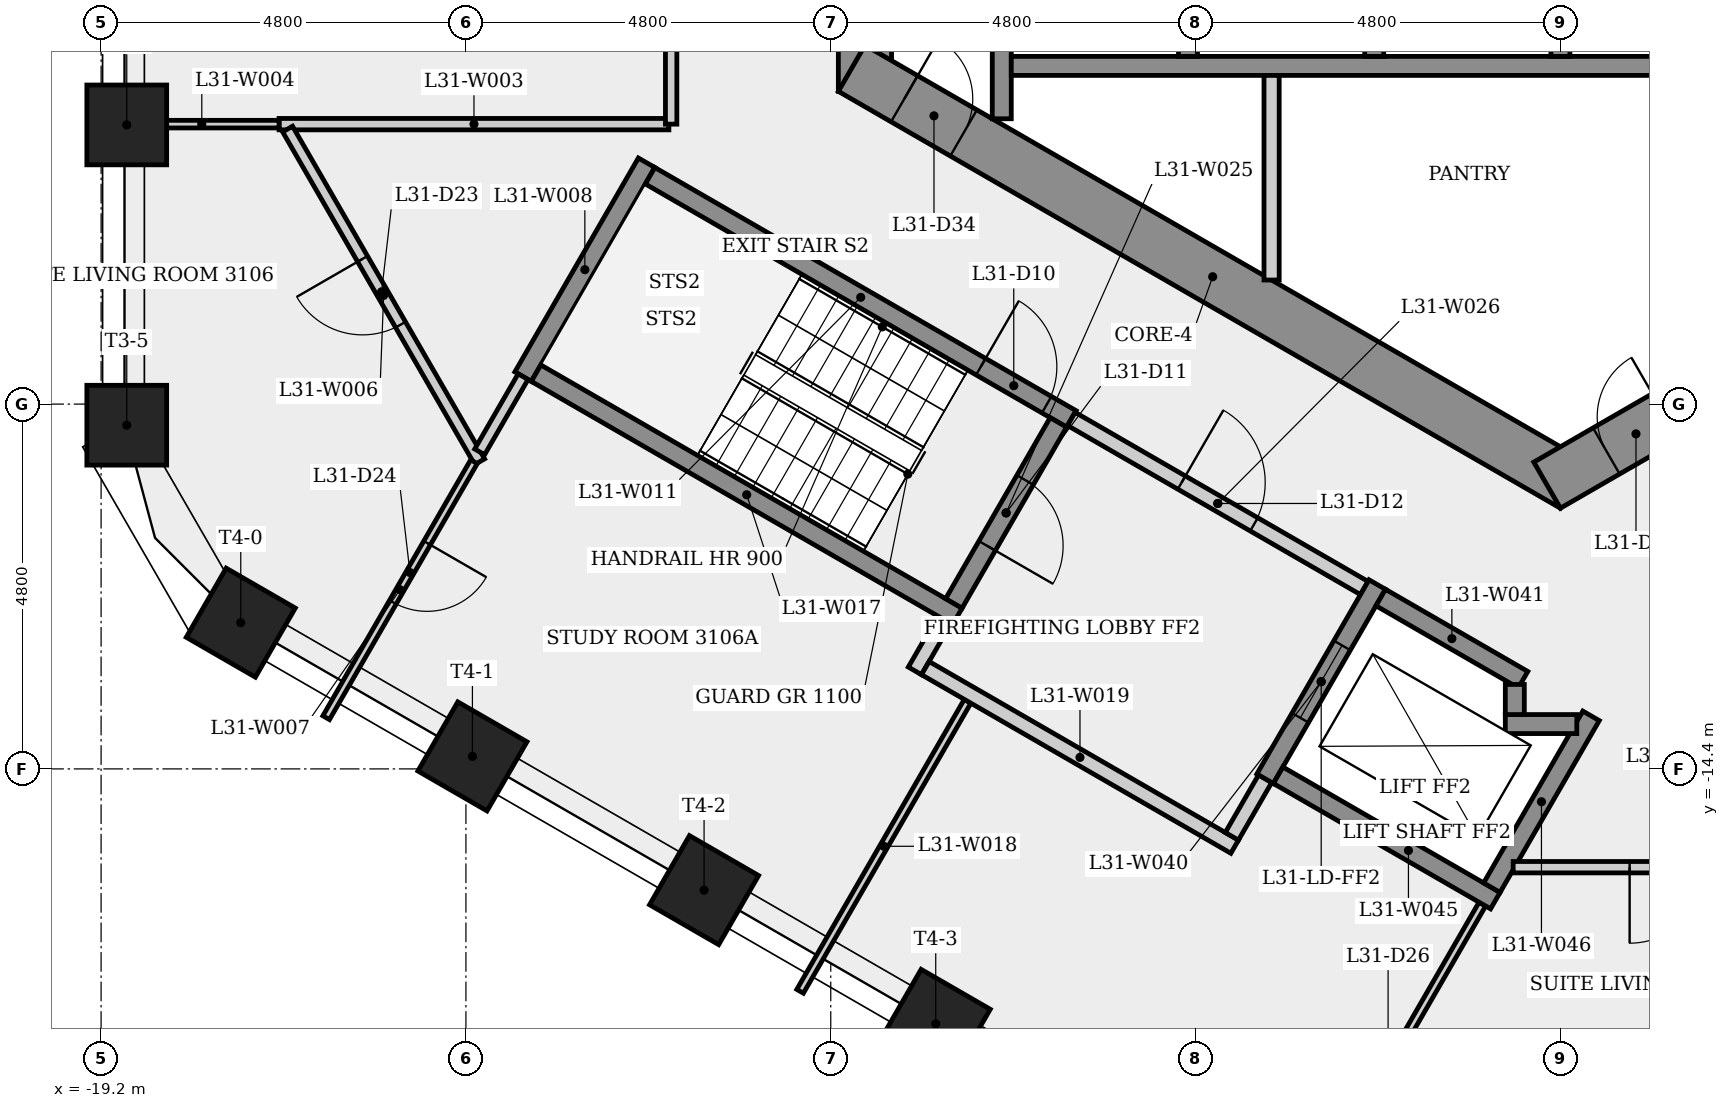
"""IFC4 building model, lengths in metres.
Left out: names, types, materials, properties, quantities, classifications, styles, units other than length and angle.
Written with IfcOpenShell. Run it as: python <this file> out.ifc"""

import sys

from ifc_helpers import new_model, si_unit, direction, frame, frame_2d, origin, origin_2d, place, context, subcontext, project, spatial, rectangle, extrude, element, fill, save


model = new_model("IFC4")
c1 = context("Model", 3, precision=1e-05, world=origin(), true_north=direction((0.0, 1.0)))
c2 = subcontext(c1, "Body", "Model", "MODEL_VIEW")
j1 = project(units=[si_unit("LENGTHUNIT", "METRE"), si_unit("PLANEANGLEUNIT", "RADIAN")], contexts=[c1])
p1 = place(None, origin())
s1 = spatial("IfcSite", under=j1, at=p1, CompositionType="ELEMENT")
p2 = place(p1, origin())
s2 = spatial("IfcBuilding", under=s1, at=p2, CompositionType="ELEMENT")
p3 = place(p2, frame((0.0, 0.0, 117.1)))
s3 = spatial("IfcBuildingStorey", under=s2, at=p3, CompositionType="ELEMENT", Elevation=117.1)
p4 = place(p3, frame((-9.15, 5.485, 0.0), z_axis=(0.0, 0.0, 1.0), x_axis=(0.0, -1.0, 0.0)))
e1 = element("IfcWall", 1, at=p4, inside=s3, PredefinedType="SHEAR", context=c2, shape_type="SweptSolid", body=[
    extrude(rectangle(XDim=10.97, YDim=0.7, at=frame_2d((5.485, 0.0))), origin(), (0.0, 0.0, 1.0), 3.4),
])
p5 = place(p4, frame((4.685, 0.0, 0.0)))
e2 = element("IfcOpeningElement", 2, at=p5, cuts=e1, PredefinedType="OPENING", context=c2, shape_type="SweptSolid", body=[
    extrude(rectangle(XDim=1.6, YDim=2.1, at=frame_2d((0.8, 1.05))), frame((0.0, 0.36, 0.0), z_axis=(0.0, -1.0, 0.0), x_axis=(1.0, 0.0, 0.0)), (0.0, 0.0, 1.0), 0.72),
])
p6 = place(p3, frame((-9.325, -5.182, 0.0), z_axis=(0.0, 0.0, 1.0), x_axis=(0.866023993627, -0.500002442456, 0.0)))
e3 = element("IfcWall", 3, at=p6, inside=s3, PredefinedType="SHEAR", context=c2, shape_type="SweptSolid", body=[
    extrude(rectangle(XDim=10.97, YDim=0.7, at=frame_2d((5.485, 0.0))), origin(), (0.0, 0.0, 1.0), 3.4),
])
p7 = place(p6, frame((0.801, 0.0, 0.0)))
e4 = element("IfcOpeningElement", 4, at=p7, cuts=e3, PredefinedType="OPENING", context=c2, shape_type="SweptSolid", body=[
    extrude(rectangle(XDim=0.9, YDim=2.1, at=frame_2d((0.45, 1.05))), frame((0.0, 0.36, 0.0), z_axis=(0.0, -1.0, 0.0), x_axis=(1.0, 0.0, 0.0)), (0.0, 0.0, 1.0), 0.72),
])
p8 = place(p3, frame((-0.175, -10.667, 0.0), z_axis=(0.0, 0.0, 1.0), x_axis=(0.866023993627, 0.500002442456, 0.0)))
e5 = element("IfcWall", 5, at=p8, inside=s3, PredefinedType="SHEAR", context=c2, shape_type="SweptSolid", body=[
    extrude(rectangle(XDim=10.97, YDim=0.7, at=frame_2d((5.485, 0.0))), origin(), (0.0, 0.0, 1.0), 3.4),
])
p9 = place(p8, frame((0.9, 0.0, 0.0)))
e6 = element("IfcOpeningElement", 6, at=p9, cuts=e5, PredefinedType="OPENING", context=c2, shape_type="SweptSolid", body=[
    extrude(rectangle(XDim=0.9, YDim=2.1, at=frame_2d((0.45, 1.05))), frame((0.0, 0.36, 0.0), z_axis=(0.0, -1.0, 0.0), x_axis=(1.0, 0.0, 0.0)), (0.0, 0.0, 1.0), 0.72),
])
p10 = place(p8, frame((7.483, 0.0, 0.0)))
e7 = element("IfcOpeningElement", 7, at=p10, cuts=e5, PredefinedType="OPENING", context=c2, shape_type="SweptSolid", body=[
    extrude(rectangle(XDim=0.9, YDim=2.1, at=frame_2d((0.45, 1.05))), frame((0.0, 0.36, 0.0), z_axis=(0.0, -1.0, 0.0), x_axis=(1.0, 0.0, 0.0)), (0.0, 0.0, 1.0), 0.72),
])
for number, where, z_axis, x_axis in (
    (8, (-18.862, -5.927, 0.0), (0.0, 0.0, 1.0), (-1.0, 0.0, 0.0)),
    (9, (-18.862, -9.878, 0.0), (0.0, 0.0, 1.0), (-1.0, 0.0, 0.0)),
    (10, (-17.362, -12.476, 0.0), (0.0, 0.0, 1.0), (-0.5, -0.866, 0.0)),
    (11, (-14.314, -14.236, 0.0), (0.0, 0.0, 1.0), (-0.5, -0.866, 0.0)),
    (12, (-11.267, -15.995, 0.0), (0.0, 0.0, 1.0), (-0.5, -0.866, 0.0)),
    (13, (-8.219, -17.755, 0.0), (0.0, 0.0, 1.0), (-0.5, -0.866, 0.0)),
):
    element("IfcColumn", number, at=place(p3, frame(where, z_axis=z_axis, x_axis=x_axis)), inside=s3, PredefinedType="COLUMN", context=c2, shape_type="SweptSolid", body=[
        extrude(rectangle(XDim=1.05, YDim=1.05, at=origin_2d()), origin(), (0.0, 0.0, 1.0), 3.4),
    ])
p11 = place(p3, frame((-16.859, -5.917, 0.0), z_axis=(0.0, 0.0, 1.0), x_axis=(1.0, 0.0, 0.0)))
e14 = element("IfcWall", 14, at=p11, inside=s3, PredefinedType="PARTITIONING", context=c2, shape_type="SweptSolid", body=[
    extrude(rectangle(XDim=5.129, YDim=0.15, at=frame_2d((2.564, 0.0))), origin(), (0.0, 0.0, 1.0), 3.0),
])
p12 = place(p3, frame((-16.858, -5.917, 0.0), z_axis=(0.0, 0.0, 1.0), x_axis=(-1.0, 0.0, 0.0)))
e15 = element("IfcWall", 15, at=p12, inside=s3, PredefinedType="PARTITIONING", context=c2, shape_type="SweptSolid", body=[
    extrude(rectangle(XDim=2.034, YDim=0.1, at=frame_2d((1.017, 0.0))), origin(), (0.0, 0.0, 1.0), 3.0),
])
p13 = place(p3, frame((-14.219, -10.358, 0.0), z_axis=(0.0, 0.0, 1.0), x_axis=(-0.499973348067, 0.866040790738, 0.0)))
e16 = element("IfcWall", 16, at=p13, inside=s3, PredefinedType="PARTITIONING", context=c2, shape_type="SweptSolid", body=[
    extrude(rectangle(XDim=5.054, YDim=0.15, at=frame_2d((2.527, 0.0))), origin(), (0.0, 0.0, 1.0), 3.0),
])
p14 = place(p13, frame((2.082, 0.0, 0.0)))
e17 = element("IfcOpeningElement", 17, at=p14, cuts=e16, PredefinedType="OPENING", context=c2, shape_type="SweptSolid", body=[
    extrude(rectangle(XDim=1.0, YDim=2.1, at=frame_2d((0.5, 1.05))), frame((0.0, 0.085, 0.0), z_axis=(0.0, -1.0, 0.0), x_axis=(1.0, 0.0, 0.0)), (0.0, 0.0, 1.0), 0.17),
])
p15 = place(p3, frame((-14.294, -10.358, 0.0), z_axis=(0.0, 0.0, 1.0), x_axis=(-0.499994147244, -0.866028782848, 0.0)))
e18 = element("IfcWall", 18, at=p15, inside=s3, PredefinedType="PARTITIONING", context=c2, shape_type="SweptSolid", body=[
    extrude(rectangle(XDim=3.889, YDim=0.1, at=frame_2d((1.945, 0.0))), origin(), (0.0, 0.0, 1.0), 3.0),
])
p16 = place(p15, frame((1.234, 0.0, 0.0)))
e19 = element("IfcOpeningElement", 19, at=p16, cuts=e18, PredefinedType="OPENING", context=c2, shape_type="SweptSolid", body=[
    extrude(rectangle(XDim=0.9, YDim=2.1, at=frame_2d((0.45, 1.05))), frame((0.0, 0.06, 0.0), z_axis=(0.0, -1.0, 0.0), x_axis=(1.0, 0.0, 0.0)), (0.0, 0.0, 1.0), 0.12),
])
p17 = place(p3, frame((-13.648, -9.239, 0.0), z_axis=(0.0, 0.0, 1.0), x_axis=(0.500017246033, 0.866015446554, 0.0)))
e20 = element("IfcWall", 20, at=p17, inside=s3, PredefinedType="SHEAR", context=c2, shape_type="SweptSolid", body=[
    extrude(rectangle(XDim=3.25, YDim=0.25, at=frame_2d((1.625, 0.0))), origin(), (0.0, 0.0, 1.0), 3.0),
])
p18 = place(p3, frame((-13.648, -9.239, 0.0), z_axis=(0.0, 0.0, 1.0), x_axis=(-0.50016012799, -0.865932934106, 0.0)))
e21 = element("IfcWall", 21, at=p18, inside=s3, PredefinedType="PARTITIONING", context=c2, shape_type="SweptSolid", body=[
    extrude(rectangle(XDim=1.143, YDim=0.15, at=frame_2d((0.571, 0.0))), origin(), (0.0, 0.0, 1.0), 3.0),
])
p19 = place(p3, frame((-11.977, -6.595, 0.0), z_axis=(0.0, 0.0, 1.0), x_axis=(0.866025499775, -0.499999833739, 0.0)))
e22 = element("IfcWall", 22, at=p19, inside=s3, PredefinedType="SHEAR", context=c2, shape_type="SweptSolid", body=[
    extrude(rectangle(XDim=6.4, YDim=0.25, at=frame_2d((3.2, 0.0))), origin(), (0.0, 0.0, 1.0), 3.0),
])
p20 = place(p19, frame((5.025, 0.0, 0.0)))
e23 = element("IfcOpeningElement", 23, at=p20, cuts=e22, PredefinedType="OPENING", context=c2, shape_type="SweptSolid", body=[
    extrude(rectangle(XDim=1.0, YDim=2.1, at=frame_2d((0.5, 1.05))), frame((0.0, 0.135, 0.0), z_axis=(0.0, -1.0, 0.0), x_axis=(1.0, 0.0, 0.0)), (0.0, 0.0, 1.0), 0.27),
])
p21 = place(p3, frame((-11.7, -5.917, 0.0), z_axis=(0.0, 0.0, 1.0), x_axis=(0.0, 1.0, 0.0)))
e24 = element("IfcWall", 24, at=p21, inside=s3, PredefinedType="PARTITIONING", context=c2, shape_type="SweptSolid", body=[
    extrude(rectangle(XDim=11.758, YDim=0.15, at=frame_2d((5.879, 0.0))), origin(), (0.0, 0.0, 1.0), 3.0),
])
p22 = place(p21, frame((5.379, 0.0, 0.0)))
e25 = element("IfcOpeningElement", 25, at=p22, cuts=e24, PredefinedType="OPENING", context=c2, shape_type="SweptSolid", body=[
    extrude(rectangle(XDim=1.0, YDim=2.1, at=frame_2d((0.5, 1.05))), frame((0.0, 0.085, 0.0), z_axis=(0.0, -1.0, 0.0), x_axis=(1.0, 0.0, 0.0)), (0.0, 0.0, 1.0), 0.17),
])
p23 = place(p3, frame((-8.493, -13.11, 0.0), z_axis=(0.0, 0.0, 1.0), x_axis=(0.500067724834, 0.865986299303, 0.0)))
e26 = element("IfcWall", 26, at=p23, inside=s3, PredefinedType="PARTITIONING", context=c2, shape_type="SweptSolid", body=[
    extrude(rectangle(XDim=0.775, YDim=0.2, at=frame_2d((0.388, 0.0))), origin(), (0.0, 0.0, 1.0), 3.0),
])
p24 = place(p3, frame((-7.935, -12.393, 0.0), z_axis=(0.0, 0.0, 1.0), x_axis=(-0.866025499775, 0.499999833739, 0.0)))
e27 = element("IfcWall", 27, at=p24, inside=s3, PredefinedType="SHEAR", context=c2, shape_type="SweptSolid", body=[
    extrude(rectangle(XDim=6.4, YDim=0.25, at=frame_2d((3.2, 0.0))), origin(), (0.0, 0.0, 1.0), 3.0),
])
p25 = place(p3, frame((-7.8, -13.51, 0.0), z_axis=(0.0, 0.0, 1.0), x_axis=(-0.5000181976, -0.86601489714, 0.0)))
e28 = element("IfcWall", 28, at=p25, inside=s3, PredefinedType="PARTITIONING", context=c2, shape_type="SweptSolid", body=[
    extrude(rectangle(XDim=4.406, YDim=0.1, at=frame_2d((2.203, 0.0))), origin(), (0.0, 0.0, 1.0), 3.0),
])
p26 = place(p3, frame((-8.356, -13.073, 0.0), z_axis=(0.0, 0.0, 1.0), x_axis=(0.866038532462, -0.499977259774, 0.0)))
e29 = element("IfcWall", 29, at=p26, inside=s3, PredefinedType="PARTITIONING", context=c2, shape_type="SweptSolid", body=[
    extrude(rectangle(XDim=4.7, YDim=0.2, at=frame_2d((2.35, 0.0))), origin(), (0.0, 0.0, 1.0), 3.0),
])
p27 = place(p3, frame((-7.35, -5.846, 0.0), z_axis=(0.0, 0.0, 1.0), x_axis=(0.0, 1.0, 0.0)))
e30 = element("IfcWall", 30, at=p27, inside=s3, PredefinedType="SHEAR", context=c2, shape_type="SweptSolid", body=[
    extrude(rectangle(XDim=4.171, YDim=0.25, at=frame_2d((2.085, 0.0))), origin(), (0.0, 0.0, 1.0), 3.0),
])
p28 = place(p3, frame((-6.605, -9.841, 0.0), z_axis=(0.0, 0.0, 1.0), x_axis=(-0.499996545922, -0.866027397988, 0.0)))
e31 = element("IfcWall", 31, at=p28, inside=s3, PredefinedType="SHEAR", context=c2, shape_type="SweptSolid", body=[
    extrude(rectangle(XDim=2.75, YDim=0.25, at=frame_2d((1.375, 0.0))), origin(), (0.0, 0.0, 1.0), 3.0),
])
p29 = place(p28, frame((0.875, 0.0, 0.0)))
e32 = element("IfcOpeningElement", 32, at=p29, cuts=e31, PredefinedType="OPENING", context=c2, shape_type="SweptSolid", body=[
    extrude(rectangle(XDim=1.0, YDim=2.1, at=frame_2d((0.5, 1.05))), frame((0.0, 0.135, 0.0), z_axis=(0.0, -1.0, 0.0), x_axis=(1.0, 0.0, 0.0)), (0.0, 0.0, 1.0), 0.27),
])
p30 = place(p3, frame((-6.435, -9.795, 0.0), z_axis=(0.0, 0.0, 1.0), x_axis=(0.866012907634, -0.500021643343, 0.0)))
e33 = element("IfcWall", 33, at=p30, inside=s3, PredefinedType="PARTITIONING", context=c2, shape_type="SweptSolid", body=[
    extrude(rectangle(XDim=4.45, YDim=0.2, at=frame_2d((2.225, 0.0))), origin(), (0.0, 0.0, 1.0), 3.0),
])
p31 = place(p30, frame((1.675, 0.0, 0.0)))
e34 = element("IfcOpeningElement", 34, at=p31, cuts=e33, PredefinedType="OPENING", context=c2, shape_type="SweptSolid", body=[
    extrude(rectangle(XDim=1.1, YDim=2.1, at=frame_2d((0.55, 1.05))), frame((0.0, 0.11, 0.0), z_axis=(0.0, -1.0, 0.0), x_axis=(1.0, 0.0, 0.0)), (0.0, 0.0, 1.0), 0.22),
])
p32 = place(p3, frame((-7.225, -5.15, 0.0), z_axis=(0.0, 0.0, 1.0), x_axis=(1.0, 0.0, 0.0)))
e35 = element("IfcWall", 35, at=p32, inside=s3, PredefinedType="SHEAR", context=c2, shape_type="SweptSolid", body=[
    extrude(rectangle(XDim=14.7, YDim=0.25, at=frame_2d((7.35, 0.0))), origin(), (0.0, 0.0, 1.0), 3.0),
])
p33 = place(p3, frame((-4.9, -1.925, 0.0), z_axis=(0.0, 0.0, 1.0), x_axis=(0.0, -1.0, 0.0)))
e36 = element("IfcWall", 36, at=p33, inside=s3, PredefinedType="SHEAR", context=c2, shape_type="SweptSolid", body=[
    extrude(rectangle(XDim=3.1, YDim=0.25, at=frame_2d((1.55, 0.0))), origin(), (0.0, 0.0, 1.0), 3.4),
])
p34 = place(p3, frame((-3.885, -14.529, 0.0), z_axis=(0.0, 0.0, 1.0), x_axis=(-0.499859285417, -0.866106630146, 0.0)))
e37 = element("IfcWall", 37, at=p34, inside=s3, PredefinedType="PARTITIONING", context=c2, shape_type="SweptSolid", body=[
    extrude(rectangle(XDim=0.875, YDim=0.2, at=frame_2d((0.438, 0.0))), origin(), (0.0, 0.0, 1.0), 3.0),
])
p35 = place(p3, frame((-3.8, -5.275, 0.0), z_axis=(0.0, 0.0, 1.0), x_axis=(0.0, -1.0, 0.0)))
e38 = element("IfcWall", 38, at=p35, inside=s3, PredefinedType="PARTITIONING", context=c2, shape_type="SweptSolid", body=[
    extrude(rectangle(XDim=2.692, YDim=0.2, at=frame_2d((1.346, 0.0))), origin(), (0.0, 0.0, 1.0), 3.0),
])
p36 = place(p3, frame((-3.768, -20.926, 0.0), z_axis=(0.0, 0.0, 1.0), x_axis=(0.499980760091, 0.866036511666, 0.0)))
e39 = element("IfcWall", 39, at=p36, inside=s3, PredefinedType="PARTITIONING", context=c2, shape_type="SweptSolid", body=[
    extrude(rectangle(XDim=5.482, YDim=0.1, at=frame_2d((2.741, 0.0))), origin(), (0.0, 0.0, 1.0), 3.0),
])
p37 = place(p36, frame((2.551, 0.0, 0.0)))
e40 = element("IfcOpeningElement", 40, at=p37, cuts=e39, PredefinedType="OPENING", context=c2, shape_type="SweptSolid", body=[
    extrude(rectangle(XDim=0.9, YDim=2.1, at=frame_2d((0.45, 1.05))), frame((0.0, 0.06, 0.0), z_axis=(0.0, -1.0, 0.0), x_axis=(1.0, 0.0, 0.0)), (0.0, 0.0, 1.0), 0.12),
])
p38 = place(p3, frame((-2.41, -11.974, 0.0), z_axis=(0.0, 0.0, 1.0), x_axis=(-0.500001826776, -0.866024349092, 0.0)))
e41 = element("IfcWall", 41, at=p38, inside=s3, PredefinedType="SHEAR", context=c2, shape_type="SweptSolid", body=[
    extrude(rectangle(XDim=2.95, YDim=0.25, at=frame_2d((1.475, 0.0))), origin(), (0.0, 0.0, 1.0), 3.0),
])
p39 = place(p38, frame((0.925, 0.0, 0.0)))
e42 = element("IfcOpeningElement", 42, at=p39, cuts=e41, PredefinedType="OPENING", context=c2, shape_type="SweptSolid", body=[
    extrude(rectangle(XDim=1.1, YDim=2.1, at=frame_2d((0.55, 1.05))), frame((0.0, 0.135, 0.0), z_axis=(0.0, -1.0, 0.0), x_axis=(1.0, 0.0, 0.0)), (0.0, 0.0, 1.0), 0.27),
])
p40 = place(p3, frame((-2.364, -12.145, 0.0), z_axis=(0.0, 0.0, 1.0), x_axis=(0.86603892542, -0.499976579108, 0.0)))
e43 = element("IfcWall", 43, at=p40, inside=s3, PredefinedType="SHEAR", context=c2, shape_type="SweptSolid", body=[
    extrude(rectangle(XDim=2.162, YDim=0.25, at=frame_2d((1.081, 0.0))), origin(), (0.0, 0.0, 1.0), 3.0),
])
p41 = place(p3, frame((-2.45, -1.925, 0.0), z_axis=(0.0, 0.0, 1.0), x_axis=(0.0, -1.0, 0.0)))
e44 = element("IfcWall", 44, at=p41, inside=s3, PredefinedType="SHEAR", context=c2, shape_type="SweptSolid", body=[
    extrude(rectangle(XDim=3.1, YDim=0.25, at=frame_2d((1.55, 0.0))), origin(), (0.0, 0.0, 1.0), 3.4),
])
p42 = place(p3, frame((-0.856, -16.133, 0.0), z_axis=(0.0, 0.0, 1.0), x_axis=(-0.866021716278, 0.500006386895, 0.0)))
e45 = element("IfcWall", 45, at=p42, inside=s3, PredefinedType="SHEAR", context=c2, shape_type="SweptSolid", body=[
    extrude(rectangle(XDim=3.3, YDim=0.25, at=frame_2d((1.65, 0.0))), origin(), (0.0, 0.0, 1.0), 3.0),
])
p43 = place(p3, frame((-0.902, -15.962, 0.0), z_axis=(0.0, 0.0, 1.0), x_axis=(0.499981517636, 0.866036074319, 0.0)))
e46 = element("IfcWall", 46, at=p43, inside=s3, PredefinedType="SHEAR", context=c2, shape_type="SweptSolid", body=[
    extrude(rectangle(XDim=2.61, YDim=0.25, at=frame_2d((1.305, 0.0))), origin(), (0.0, 0.0, 1.0), 3.0),
])
p44 = place(p3, frame((-0.725, -13.81, 0.0), z_axis=(0.0, 0.0, 1.0), x_axis=(1.0, 0.0, 0.0)))
e47 = element("IfcWall", 47, at=p44, inside=s3, PredefinedType="SHEAR", context=c2, shape_type="SweptSolid", body=[
    extrude(rectangle(XDim=0.941, YDim=0.25, at=frame_2d((0.47, 0.0))), origin(), (0.0, 0.0, 1.0), 3.4),
])
p45 = place(p3, frame((-0.6, -13.289, 0.0), z_axis=(0.0, 0.0, 1.0), x_axis=(0.0, -1.0, 0.0)))
e48 = element("IfcWall", 48, at=p45, inside=s3, PredefinedType="SHEAR", context=c2, shape_type="SweptSolid", body=[
    extrude(rectangle(XDim=0.396, YDim=0.25, at=frame_2d((0.198, 0.0))), origin(), (0.0, 0.0, 1.0), 3.4),
])
p46 = place(p3, frame((0.0, -1.925, 0.0), z_axis=(0.0, 0.0, 1.0), x_axis=(0.0, -1.0, 0.0)))
e49 = element("IfcWall", 49, at=p46, inside=s3, PredefinedType="SHEAR", context=c2, shape_type="SweptSolid", body=[
    extrude(rectangle(XDim=3.1, YDim=0.25, at=frame_2d((1.55, 0.0))), origin(), (0.0, 0.0, 1.0), 3.4),
])
p47 = place(p3, frame((3.443, -15.693, 0.0), z_axis=(0.0, 0.0, 1.0), x_axis=(-1.0, 0.0, 0.0)))
e50 = element("IfcWall", 50, at=p47, inside=s3, PredefinedType="PARTITIONING", context=c2, shape_type="SweptSolid", body=[
    extrude(rectangle(XDim=4.064, YDim=0.15, at=frame_2d((2.032, 0.0))), origin(), (0.0, 0.0, 1.0), 3.0),
])
p48 = place(p47, frame((1.532, 0.0, 0.0)))
e51 = element("IfcOpeningElement", 51, at=p48, cuts=e50, PredefinedType="OPENING", context=c2, shape_type="SweptSolid", body=[
    extrude(rectangle(XDim=1.0, YDim=2.1, at=frame_2d((0.5, 1.05))), frame((0.0, 0.085, 0.0), z_axis=(0.0, -1.0, 0.0), x_axis=(1.0, 0.0, 0.0)), (0.0, 0.0, 1.0), 0.17),
])
p49 = place(p20, origin())
e52 = element("IfcDoor", 52, at=p49, inside=s3, OperationType="SINGLE_SWING_LEFT", PredefinedType="DOOR", context=c2, shape_type="SweptSolid", body=[
    extrude(rectangle(XDim=1.0, YDim=2.1, at=frame_2d((0.5, 1.05))), frame((0.0, 0.025, 0.0), z_axis=(0.0, -1.0, 0.0), x_axis=(1.0, 0.0, 0.0)), (0.0, 0.0, 1.0), 0.05),
])
fill(e23, e52)
p50 = place(p29, origin())
e53 = element("IfcDoor", 53, at=p50, inside=s3, OperationType="SINGLE_SWING_RIGHT", PredefinedType="DOOR", context=c2, shape_type="SweptSolid", body=[
    extrude(rectangle(XDim=1.0, YDim=2.1, at=frame_2d((0.5, 1.05))), frame((0.0, 0.025, 0.0), z_axis=(0.0, -1.0, 0.0), x_axis=(1.0, 0.0, 0.0)), (0.0, 0.0, 1.0), 0.05),
])
fill(e32, e53)
p51 = place(p31, origin())
e54 = element("IfcDoor", 54, at=p51, inside=s3, OperationType="SINGLE_SWING_LEFT", PredefinedType="DOOR", context=c2, shape_type="SweptSolid", body=[
    extrude(rectangle(XDim=1.1, YDim=2.1, at=frame_2d((0.55, 1.05))), frame((0.0, 0.025, 0.0), z_axis=(0.0, -1.0, 0.0), x_axis=(1.0, 0.0, 0.0)), (0.0, 0.0, 1.0), 0.05),
])
fill(e34, e54)
p52 = place(p39, origin())
e55 = element("IfcDoor", 55, at=p52, inside=s3, OperationType="SLIDING_TO_LEFT", PredefinedType="DOOR", context=c2, shape_type="SweptSolid", body=[
    extrude(rectangle(XDim=1.1, YDim=2.1, at=frame_2d((0.55, 1.05))), frame((0.0, 0.025, 0.0), z_axis=(0.0, -1.0, 0.0), x_axis=(1.0, 0.0, 0.0)), (0.0, 0.0, 1.0), 0.05),
])
fill(e42, e55)
p53 = place(p14, origin())
e56 = element("IfcDoor", 56, at=p53, inside=s3, OperationType="SINGLE_SWING_RIGHT", PredefinedType="DOOR", context=c2, shape_type="SweptSolid", body=[
    extrude(rectangle(XDim=1.0, YDim=2.1, at=frame_2d((0.5, 1.05))), frame((0.0, 0.025, 0.0), z_axis=(0.0, -1.0, 0.0), x_axis=(1.0, 0.0, 0.0)), (0.0, 0.0, 1.0), 0.05),
])
fill(e17, e56)
p54 = place(p16, origin())
e57 = element("IfcDoor", 57, at=p54, inside=s3, OperationType="SINGLE_SWING_LEFT", PredefinedType="DOOR", context=c2, shape_type="SweptSolid", body=[
    extrude(rectangle(XDim=0.9, YDim=2.1, at=frame_2d((0.45, 1.05))), frame((0.0, 0.025, 0.0), z_axis=(0.0, -1.0, 0.0), x_axis=(1.0, 0.0, 0.0)), (0.0, 0.0, 1.0), 0.05),
])
fill(e19, e57)
p55 = place(p48, origin())
e58 = element("IfcDoor", 58, at=p55, inside=s3, OperationType="SINGLE_SWING_RIGHT", PredefinedType="DOOR", context=c2, shape_type="SweptSolid", body=[
    extrude(rectangle(XDim=1.0, YDim=2.1, at=frame_2d((0.5, 1.05))), frame((0.0, 0.025, 0.0), z_axis=(0.0, -1.0, 0.0), x_axis=(1.0, 0.0, 0.0)), (0.0, 0.0, 1.0), 0.05),
])
fill(e51, e58)
p56 = place(p7, origin())
e59 = element("IfcDoor", 59, at=p56, inside=s3, OperationType="SINGLE_SWING_LEFT", PredefinedType="DOOR", context=c2, shape_type="SweptSolid", body=[
    extrude(rectangle(XDim=0.9, YDim=2.1, at=frame_2d((0.45, 1.05))), frame((0.0, 0.025, 0.0), z_axis=(0.0, -1.0, 0.0), x_axis=(1.0, 0.0, 0.0)), (0.0, 0.0, 1.0), 0.05),
])
fill(e4, e59)
p57 = place(p9, origin())
e60 = element("IfcDoor", 60, at=p57, inside=s3, OperationType="SINGLE_SWING_RIGHT", PredefinedType="DOOR", context=c2, shape_type="SweptSolid", body=[
    extrude(rectangle(XDim=0.9, YDim=2.1, at=frame_2d((0.45, 1.05))), frame((0.0, 0.025, 0.0), z_axis=(0.0, -1.0, 0.0), x_axis=(1.0, 0.0, 0.0)), (0.0, 0.0, 1.0), 0.05),
])
fill(e6, e60)
save(model, sys.argv[1])
